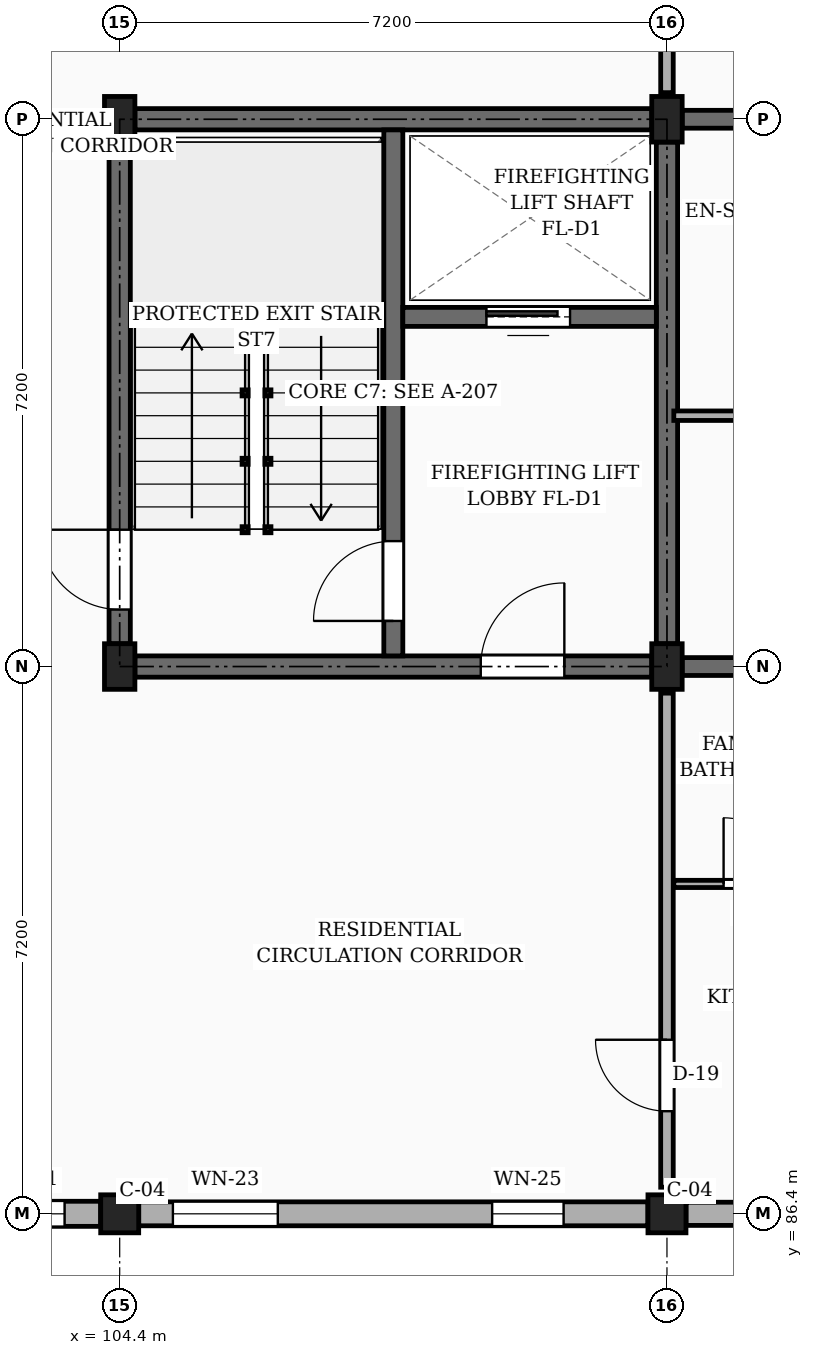
"""IFC4 building model, lengths in metres.
Left out: names, types, materials, properties, quantities, classifications, styles, units other than length and angle.
Written with IfcOpenShell. Run it as: python <this file> out.ifc"""

import sys

from ifc_helpers import new_model, si_unit, direction, frame, frame_2d, origin, origin_2d, place, context, subcontext, project, spatial, rectangle, extrude, element, fill, save


model = new_model("IFC4")
c1 = context("Model", 3, precision=1e-05, world=origin(), true_north=direction((0.0, 1.0)))
c2 = subcontext(c1, "Body", "Model", "MODEL_VIEW")
j1 = project(units=[si_unit("LENGTHUNIT", "METRE"), si_unit("PLANEANGLEUNIT", "RADIAN")], contexts=[c1])
p1 = place(None, origin())
s1 = spatial("IfcSite", under=j1, at=p1, CompositionType="ELEMENT")
p2 = place(p1, origin())
s2 = spatial("IfcBuilding", under=s1, at=p2, CompositionType="ELEMENT")
p3 = place(p2, frame((0.0, 0.0, 23.4)))
s3 = spatial("IfcBuildingStorey", under=s2, at=p3, CompositionType="ELEMENT", Elevation=23.4)
p4 = place(p3, frame((104.4, 86.4, 0.0), z_axis=(0.0, 0.0, 1.0), x_axis=(1.0, 0.0, 0.0)))
e1 = element("IfcColumn", 1, at=p4, inside=s3, PredefinedType="COLUMN", context=c2, shape_type="SweptSolid", body=[
    extrude(rectangle(XDim=0.5, YDim=0.5, at=origin_2d()), origin(), (0.0, 0.0, 1.0), 3.15),
])
for number, where, z_axis, x_axis in (
    (2, (104.4, 93.6, 0.0), (0.0, 0.0, 1.0), (1.0, 0.0, 0.0)),
    (3, (104.4, 100.8, 0.0), (0.0, 0.0, 1.0), (1.0, 0.0, 0.0)),
):
    element("IfcColumn", number, at=place(p3, frame(where, z_axis=z_axis, x_axis=x_axis)), inside=s3, PredefinedType="COLUMN", context=c2, shape_type="SweptSolid", body=[
        extrude(rectangle(XDim=0.4, YDim=0.6, at=origin_2d()), origin(), (0.0, 0.0, 1.0), 3.15),
    ])
p5 = place(p3, frame((111.6, 86.4, 0.0), z_axis=(0.0, 0.0, 1.0), x_axis=(1.0, 0.0, 0.0)))
e4 = element("IfcColumn", 4, at=p5, inside=s3, PredefinedType="COLUMN", context=c2, shape_type="SweptSolid", body=[
    extrude(rectangle(XDim=0.5, YDim=0.5, at=origin_2d()), origin(), (0.0, 0.0, 1.0), 3.15),
])
for number, where, z_axis, x_axis in (
    (5, (111.6, 93.6, 0.0), (0.0, 0.0, 1.0), (1.0, 0.0, 0.0)),
    (6, (111.6, 100.8, 0.0), (0.0, 0.0, 1.0), (1.0, 0.0, 0.0)),
):
    element("IfcColumn", number, at=place(p3, frame(where, z_axis=z_axis, x_axis=x_axis)), inside=s3, PredefinedType="COLUMN", context=c2, shape_type="SweptSolid", body=[
        extrude(rectangle(XDim=0.4, YDim=0.6, at=origin_2d()), origin(), (0.0, 0.0, 1.0), 3.15),
    ])
p6 = place(p3, frame((111.8, 93.6, 0.0), z_axis=(0.0, 0.0, 1.0), x_axis=(1.0, 0.0, 0.0)))
e7 = element("IfcWall", 7, at=p6, inside=s3, PredefinedType="SOLIDWALL", context=c2, shape_type="SweptSolid", body=[
    extrude(rectangle(XDim=6.75, YDim=0.235, at=frame_2d((3.375, 0.0))), origin(), (0.0, 0.0, 1.0), 2.19),
])
p7 = place(p6, frame((4.35, 0.0, 0.0)))
e8 = element("IfcOpeningElement", 8, at=p7, cuts=e7, PredefinedType="OPENING", context=c2, shape_type="SweptSolid", body=[
    extrude(rectangle(XDim=0.98, YDim=2.12, at=frame_2d((0.49, 1.06))), frame((0.0, 0.127, 0.0), z_axis=(0.0, -1.0, 0.0), x_axis=(1.0, 0.0, 0.0)), (0.0, 0.0, 1.0), 0.255),
])
p8 = place(p3, frame((111.8, 100.8, 0.0), z_axis=(0.0, 0.0, 1.0), x_axis=(1.0, 0.0, 0.0)))
e9 = element("IfcWall", 9, at=p8, inside=s3, PredefinedType="SOLIDWALL", context=c2, shape_type="SweptSolid", body=[
    extrude(rectangle(XDim=6.75, YDim=0.235, at=frame_2d((3.375, 0.0))), origin(), (0.0, 0.0, 1.0), 2.19),
])
p9 = place(p3, frame((97.45, 86.4, 0.0), z_axis=(0.0, 0.0, 1.0), x_axis=(1.0, 0.0, 0.0)))
e10 = element("IfcWall", 10, at=p9, inside=s3, PredefinedType="SOLIDWALL", context=c2, shape_type="SweptSolid", body=[
    extrude(rectangle(XDim=6.7, YDim=0.33, at=frame_2d((3.35, 0.0))), origin(), (0.0, 0.0, 1.0), 2.46),
])
p10 = place(p9, frame((0.995, 0.0, 0.78)))
e11 = element("IfcOpeningElement", 11, at=p10, cuts=e10, PredefinedType="OPENING", context=c2, shape_type="SweptSolid", body=[
    extrude(rectangle(XDim=1.14, YDim=1.36, at=frame_2d((0.57, 0.68))), frame((0.0, 0.175, 0.0), z_axis=(0.0, -1.0, 0.0), x_axis=(1.0, 0.0, 0.0)), (0.0, 0.0, 1.0), 0.35),
])
p11 = place(p9, frame((3.27, 0.0, 0.78)))
e12 = element("IfcOpeningElement", 12, at=p11, cuts=e10, PredefinedType="OPENING", context=c2, shape_type="SweptSolid", body=[
    extrude(rectangle(XDim=1.3, YDim=1.36, at=frame_2d((0.65, 0.68))), frame((0.0, 0.175, 0.0), z_axis=(0.0, -1.0, 0.0), x_axis=(1.0, 0.0, 0.0)), (0.0, 0.0, 1.0), 0.35),
])
p12 = place(p9, frame((5.185, 0.0, 0.78)))
e13 = element("IfcOpeningElement", 13, at=p12, cuts=e10, PredefinedType="OPENING", context=c2, shape_type="SweptSolid", body=[
    extrude(rectangle(XDim=1.04, YDim=1.26, at=frame_2d((0.52, 0.63))), frame((0.0, 0.175, 0.0), z_axis=(0.0, -1.0, 0.0), x_axis=(1.0, 0.0, 0.0)), (0.0, 0.0, 1.0), 0.35),
])
p13 = place(p3, frame((104.65, 86.4, 0.0), z_axis=(0.0, 0.0, 1.0), x_axis=(1.0, 0.0, 0.0)))
e14 = element("IfcWall", 14, at=p13, inside=s3, PredefinedType="SOLIDWALL", context=c2, shape_type="SweptSolid", body=[
    extrude(rectangle(XDim=6.7, YDim=0.315, at=frame_2d((3.35, 0.0))), origin(), (0.0, 0.0, 1.0), 2.46),
])
p14 = place(p13, frame((0.45, 0.0, 0.78)))
e15 = element("IfcOpeningElement", 15, at=p14, cuts=e14, PredefinedType="OPENING", context=c2, shape_type="SweptSolid", body=[
    extrude(rectangle(XDim=1.38, YDim=1.36, at=frame_2d((0.69, 0.68))), frame((0.0, 0.167, 0.0), z_axis=(0.0, -1.0, 0.0), x_axis=(1.0, 0.0, 0.0)), (0.0, 0.0, 1.0), 0.335),
])
p15 = place(p13, frame((4.65, 0.0, 0.78)))
e16 = element("IfcOpeningElement", 16, at=p15, cuts=e14, PredefinedType="OPENING", context=c2, shape_type="SweptSolid", body=[
    extrude(rectangle(XDim=0.94, YDim=1.44, at=frame_2d((0.47, 0.72))), frame((0.0, 0.167, 0.0), z_axis=(0.0, -1.0, 0.0), x_axis=(1.0, 0.0, 0.0)), (0.0, 0.0, 1.0), 0.335),
])
p16 = place(p3, frame((111.85, 86.4, 0.0), z_axis=(0.0, 0.0, 1.0), x_axis=(1.0, 0.0, 0.0)))
e17 = element("IfcWall", 17, at=p16, inside=s3, PredefinedType="SOLIDWALL", context=c2, shape_type="SweptSolid", body=[
    extrude(rectangle(XDim=6.7, YDim=0.305, at=frame_2d((3.35, 0.0))), origin(), (0.0, 0.0, 1.0), 2.46),
])
p17 = place(p16, frame((0.645, 0.0, 0.78)))
e18 = element("IfcOpeningElement", 18, at=p17, cuts=e17, PredefinedType="OPENING", context=c2, shape_type="SweptSolid", body=[
    extrude(rectangle(XDim=0.94, YDim=1.44, at=frame_2d((0.47, 0.72))), frame((0.0, 0.163, 0.0), z_axis=(0.0, -1.0, 0.0), x_axis=(1.0, 0.0, 0.0)), (0.0, 0.0, 1.0), 0.325),
])
p18 = place(p16, frame((3.75, 0.0, 0.78)))
e19 = element("IfcOpeningElement", 19, at=p18, cuts=e17, PredefinedType="OPENING", context=c2, shape_type="SweptSolid", body=[
    extrude(rectangle(XDim=1.15, YDim=1.44, at=frame_2d((0.575, 0.72))), frame((0.0, 0.163, 0.0), z_axis=(0.0, -1.0, 0.0), x_axis=(1.0, 0.0, 0.0)), (0.0, 0.0, 1.0), 0.325),
])
p19 = place(p3, frame((104.4, 93.9, 0.0), z_axis=(0.0, 0.0, 1.0), x_axis=(0.0, 1.0, 0.0)))
e20 = element("IfcWall", 20, at=p19, inside=s3, PredefinedType="SHEAR", context=c2, shape_type="SweptSolid", body=[
    extrude(rectangle(XDim=6.6, YDim=0.28, at=frame_2d((3.3, 0.0))), origin(), (0.0, 0.0, 1.0), 2.89),
])
p20 = place(p19, frame((0.45, 0.0, 0.0)))
e21 = element("IfcOpeningElement", 21, at=p20, cuts=e20, PredefinedType="OPENING", context=c2, shape_type="SweptSolid", body=[
    extrude(rectangle(XDim=1.05, YDim=2.15, at=frame_2d((0.525, 1.075))), frame((0.0, 0.15, 0.0), z_axis=(0.0, -1.0, 0.0), x_axis=(1.0, 0.0, 0.0)), (0.0, 0.0, 1.0), 0.3),
])
p21 = place(p3, frame((104.6, 100.8, 0.0), z_axis=(0.0, 0.0, 1.0), x_axis=(1.0, 0.0, 0.0)))
e22 = element("IfcWall", 22, at=p21, inside=s3, PredefinedType="SHEAR", context=c2, shape_type="SweptSolid", body=[
    extrude(rectangle(XDim=6.8, YDim=0.28, at=frame_2d((3.4, 0.0))), origin(), (0.0, 0.0, 1.0), 2.89),
])
p22 = place(p3, frame((111.6, 93.9, 0.0), z_axis=(0.0, 0.0, 1.0), x_axis=(0.0, 1.0, 0.0)))
e23 = element("IfcWall", 23, at=p22, inside=s3, PredefinedType="SHEAR", context=c2, shape_type="SweptSolid", body=[
    extrude(rectangle(XDim=6.6, YDim=0.28, at=frame_2d((3.3, 0.0))), origin(), (0.0, 0.0, 1.0), 2.89),
])
p23 = place(p3, frame((104.6, 93.6, 0.0), z_axis=(0.0, 0.0, 1.0), x_axis=(1.0, 0.0, 0.0)))
e24 = element("IfcWall", 24, at=p23, inside=s3, PredefinedType="SHEAR", context=c2, shape_type="SweptSolid", body=[
    extrude(rectangle(XDim=6.8, YDim=0.28, at=frame_2d((3.4, 0.0))), origin(), (0.0, 0.0, 1.0), 2.89),
])
p24 = place(p23, frame((4.55, 0.0, 0.0)))
e25 = element("IfcOpeningElement", 25, at=p24, cuts=e24, PredefinedType="OPENING", context=c2, shape_type="SweptSolid", body=[
    extrude(rectangle(XDim=1.1, YDim=2.15, at=frame_2d((0.55, 1.075))), frame((0.0, 0.15, 0.0), z_axis=(0.0, -1.0, 0.0), x_axis=(1.0, 0.0, 0.0)), (0.0, 0.0, 1.0), 0.3),
])
p25 = place(p3, frame((108.0, 93.74, 0.0), z_axis=(0.0, 0.0, 1.0), x_axis=(0.0, 1.0, 0.0)))
e26 = element("IfcWall", 26, at=p25, inside=s3, PredefinedType="SHEAR", context=c2, shape_type="SweptSolid", body=[
    extrude(rectangle(XDim=6.92, YDim=0.25, at=frame_2d((3.46, 0.0))), origin(), (0.0, 0.0, 1.0), 2.89),
])
p26 = place(p25, frame((0.46, 0.0, 0.0)))
e27 = element("IfcOpeningElement", 27, at=p26, cuts=e26, PredefinedType="OPENING", context=c2, shape_type="SweptSolid", body=[
    extrude(rectangle(XDim=1.05, YDim=2.15, at=frame_2d((0.525, 1.075))), frame((0.0, 0.135, 0.0), z_axis=(0.0, -1.0, 0.0), x_axis=(1.0, 0.0, 0.0)), (0.0, 0.0, 1.0), 0.27),
])
p27 = place(p3, frame((108.125, 98.2, 0.0), z_axis=(0.0, 0.0, 1.0), x_axis=(1.0, 0.0, 0.0)))
e28 = element("IfcWall", 28, at=p27, inside=s3, PredefinedType="SHEAR", context=c2, shape_type="SweptSolid", body=[
    extrude(rectangle(XDim=3.335, YDim=0.25, at=frame_2d((1.667, 0.0))), origin(), (0.0, 0.0, 1.0), 2.89),
])
p28 = place(p27, frame((1.1, 0.0, 0.0)))
e29 = element("IfcOpeningElement", 29, at=p28, cuts=e28, PredefinedType="OPENING", context=c2, shape_type="SweptSolid", body=[
    extrude(rectangle(XDim=1.1, YDim=2.2, at=frame_2d((0.55, 1.1))), frame((0.0, 0.135, 0.0), z_axis=(0.0, -1.0, 0.0), x_axis=(1.0, 0.0, 0.0)), (0.0, 0.0, 1.0), 0.27),
])
p29 = place(p3, frame((111.6, 86.75, 0.0), z_axis=(0.0, 0.0, 1.0), x_axis=(0.0, 1.0, 0.0)))
e30 = element("IfcWall", 30, at=p29, inside=s3, PredefinedType="PARTITIONING", context=c2, shape_type="SweptSolid", body=[
    extrude(rectangle(XDim=6.5, YDim=0.165, at=frame_2d((3.25, 0.0))), origin(), (0.0, 0.0, 1.0), 2.325),
])
p30 = place(p29, frame((1.0, 0.0, 0.0)))
e31 = element("IfcOpeningElement", 31, at=p30, cuts=e30, PredefinedType="OPENING", context=c2, shape_type="SweptSolid", body=[
    extrude(rectangle(XDim=0.94, YDim=2.12, at=frame_2d((0.47, 1.06))), frame((0.0, 0.093, 0.0), z_axis=(0.0, -1.0, 0.0), x_axis=(1.0, 0.0, 0.0)), (0.0, 0.0, 1.0), 0.185),
])
p31 = place(p3, frame((111.6, 101.15, 0.0), z_axis=(0.0, 0.0, 1.0), x_axis=(0.0, 1.0, 0.0)))
e32 = element("IfcWall", 32, at=p31, inside=s3, PredefinedType="PARTITIONING", context=c2, shape_type="SweptSolid", body=[
    extrude(rectangle(XDim=6.5, YDim=0.165, at=frame_2d((3.25, 0.0))), origin(), (0.0, 0.0, 1.0), 2.325),
])
p32 = place(p31, frame((1.1, 0.0, 0.0)))
e33 = element("IfcOpeningElement", 33, at=p32, cuts=e32, PredefinedType="OPENING", context=c2, shape_type="SweptSolid", body=[
    extrude(rectangle(XDim=1.14, YDim=2.18, at=frame_2d((0.57, 1.09))), frame((0.0, 0.093, 0.0), z_axis=(0.0, -1.0, 0.0), x_axis=(1.0, 0.0, 0.0)), (0.0, 0.0, 1.0), 0.185),
])
p33 = place(p3, frame((111.69, 90.74, 0.0), z_axis=(0.0, 0.0, 1.0), x_axis=(1.0, 0.0, 0.0)))
e34 = element("IfcWall", 34, at=p33, inside=s3, PredefinedType="PARTITIONING", context=c2, shape_type="SweptSolid", body=[
    extrude(rectangle(XDim=2.18, YDim=0.095, at=frame_2d((1.09, 0.0))), origin(), (0.0, 0.0, 1.0), 2.325),
])
p34 = place(p33, frame((0.655, 0.0, 0.0)))
e35 = element("IfcOpeningElement", 35, at=p34, cuts=e34, PredefinedType="OPENING", context=c2, shape_type="SweptSolid", body=[
    extrude(rectangle(XDim=0.87, YDim=2.05, at=frame_2d((0.435, 1.025))), frame((0.0, 0.058, 0.0), z_axis=(0.0, -1.0, 0.0), x_axis=(1.0, 0.0, 0.0)), (0.0, 0.0, 1.0), 0.115),
])
p35 = place(p3, frame((111.69, 96.9, 0.0), z_axis=(0.0, 0.0, 1.0), x_axis=(1.0, 0.0, 0.0)))
e36 = element("IfcWall", 36, at=p35, inside=s3, PredefinedType="PARTITIONING", context=c2, shape_type="SweptSolid", body=[
    extrude(rectangle(XDim=6.935, YDim=0.125, at=frame_2d((3.468, 0.0))), origin(), (0.0, 0.0, 1.0), 2.325),
])
p36 = place(p35, frame((1.1, 0.0, 0.0)))
e37 = element("IfcOpeningElement", 37, at=p36, cuts=e36, PredefinedType="OPENING", context=c2, shape_type="SweptSolid", body=[
    extrude(rectangle(XDim=0.87, YDim=2.05, at=frame_2d((0.435, 1.025))), frame((0.0, 0.073, 0.0), z_axis=(0.0, -1.0, 0.0), x_axis=(1.0, 0.0, 0.0)), (0.0, 0.0, 1.0), 0.145),
])
p37 = place(p35, frame((4.5, 0.0, 0.0)))
e38 = element("IfcOpeningElement", 38, at=p37, cuts=e36, PredefinedType="OPENING", context=c2, shape_type="SweptSolid", body=[
    extrude(rectangle(XDim=0.88, YDim=2.08, at=frame_2d((0.44, 1.04))), frame((0.0, 0.073, 0.0), z_axis=(0.0, -1.0, 0.0), x_axis=(1.0, 0.0, 0.0)), (0.0, 0.0, 1.0), 0.145),
])
p38 = place(p12, origin())
e39 = element("IfcWindow", 39, at=p38, inside=s3, PartitioningType="SINGLE_PANEL", PredefinedType="WINDOW", context=c2, shape_type="SweptSolid", body=[
    extrude(rectangle(XDim=1.04, YDim=1.26, at=frame_2d((0.52, 0.63))), frame((0.0, 0.03, 0.0), z_axis=(0.0, -1.0, 0.0), x_axis=(1.0, 0.0, 0.0)), (0.0, 0.0, 1.0), 0.06),
])
fill(e13, e39)
p39 = place(p14, origin())
e40 = element("IfcWindow", 40, at=p39, inside=s3, PartitioningType="SINGLE_PANEL", PredefinedType="WINDOW", context=c2, shape_type="SweptSolid", body=[
    extrude(rectangle(XDim=1.38, YDim=1.36, at=frame_2d((0.69, 0.68))), frame((0.0, 0.03, 0.0), z_axis=(0.0, -1.0, 0.0), x_axis=(1.0, 0.0, 0.0)), (0.0, 0.0, 1.0), 0.06),
])
fill(e15, e40)
p40 = place(p15, origin())
e41 = element("IfcWindow", 41, at=p40, inside=s3, PartitioningType="SINGLE_PANEL", PredefinedType="WINDOW", context=c2, shape_type="SweptSolid", body=[
    extrude(rectangle(XDim=0.94, YDim=1.44, at=frame_2d((0.47, 0.72))), frame((0.0, 0.03, 0.0), z_axis=(0.0, -1.0, 0.0), x_axis=(1.0, 0.0, 0.0)), (0.0, 0.0, 1.0), 0.06),
])
fill(e16, e41)
p41 = place(p20, origin())
e42 = element("IfcDoor", 42, at=p41, inside=s3, OperationType="SINGLE_SWING_RIGHT", PredefinedType="DOOR", context=c2, shape_type="SweptSolid", body=[
    extrude(rectangle(XDim=1.05, YDim=2.15, at=frame_2d((0.525, 1.075))), frame((0.0, 0.025, 0.0), z_axis=(0.0, -1.0, 0.0), x_axis=(1.0, 0.0, 0.0)), (0.0, 0.0, 1.0), 0.05),
])
fill(e21, e42)
p42 = place(p24, frame((1.1, 0.0, 0.0), z_axis=(0.0, 0.0, 1.0), x_axis=(-1.0, 0.0, 0.0)))
e43 = element("IfcDoor", 43, at=p42, inside=s3, OperationType="SINGLE_SWING_RIGHT", PredefinedType="DOOR", context=c2, shape_type="SweptSolid", body=[
    extrude(rectangle(XDim=1.1, YDim=2.15, at=frame_2d((0.55, 1.075))), frame((0.0, 0.025, 0.0), z_axis=(0.0, -1.0, 0.0), x_axis=(1.0, 0.0, 0.0)), (0.0, 0.0, 1.0), 0.05),
])
fill(e25, e43)
p43 = place(p26, origin())
e44 = element("IfcDoor", 44, at=p43, inside=s3, OperationType="SINGLE_SWING_LEFT", PredefinedType="DOOR", context=c2, shape_type="SweptSolid", body=[
    extrude(rectangle(XDim=1.05, YDim=2.15, at=frame_2d((0.525, 1.075))), frame((0.0, 0.025, 0.0), z_axis=(0.0, -1.0, 0.0), x_axis=(1.0, 0.0, 0.0)), (0.0, 0.0, 1.0), 0.05),
])
fill(e27, e44)
p44 = place(p28, origin())
e45 = element("IfcDoor", 45, at=p44, inside=s3, OperationType="SLIDING_TO_LEFT", PredefinedType="DOOR", context=c2, shape_type="SweptSolid", body=[
    extrude(rectangle(XDim=1.1, YDim=2.2, at=frame_2d((0.55, 1.1))), frame((0.0, 0.025, 0.0), z_axis=(0.0, -1.0, 0.0), x_axis=(1.0, 0.0, 0.0)), (0.0, 0.0, 1.0), 0.05),
])
fill(e29, e45)
p45 = place(p30, origin())
e46 = element("IfcDoor", 46, at=p45, inside=s3, OperationType="SINGLE_SWING_RIGHT", PredefinedType="DOOR", context=c2, shape_type="SweptSolid", body=[
    extrude(rectangle(XDim=0.94, YDim=2.12, at=frame_2d((0.47, 1.06))), frame((0.0, 0.025, 0.0), z_axis=(0.0, -1.0, 0.0), x_axis=(1.0, 0.0, 0.0)), (0.0, 0.0, 1.0), 0.05),
])
fill(e31, e46)
p46 = place(p34, origin())
e47 = element("IfcDoor", 47, at=p46, inside=s3, OperationType="SINGLE_SWING_LEFT", PredefinedType="DOOR", context=c2, shape_type="SweptSolid", body=[
    extrude(rectangle(XDim=0.87, YDim=2.05, at=frame_2d((0.435, 1.025))), frame((0.0, 0.025, 0.0), z_axis=(0.0, -1.0, 0.0), x_axis=(1.0, 0.0, 0.0)), (0.0, 0.0, 1.0), 0.05),
])
fill(e35, e47)
save(model, sys.argv[1])
